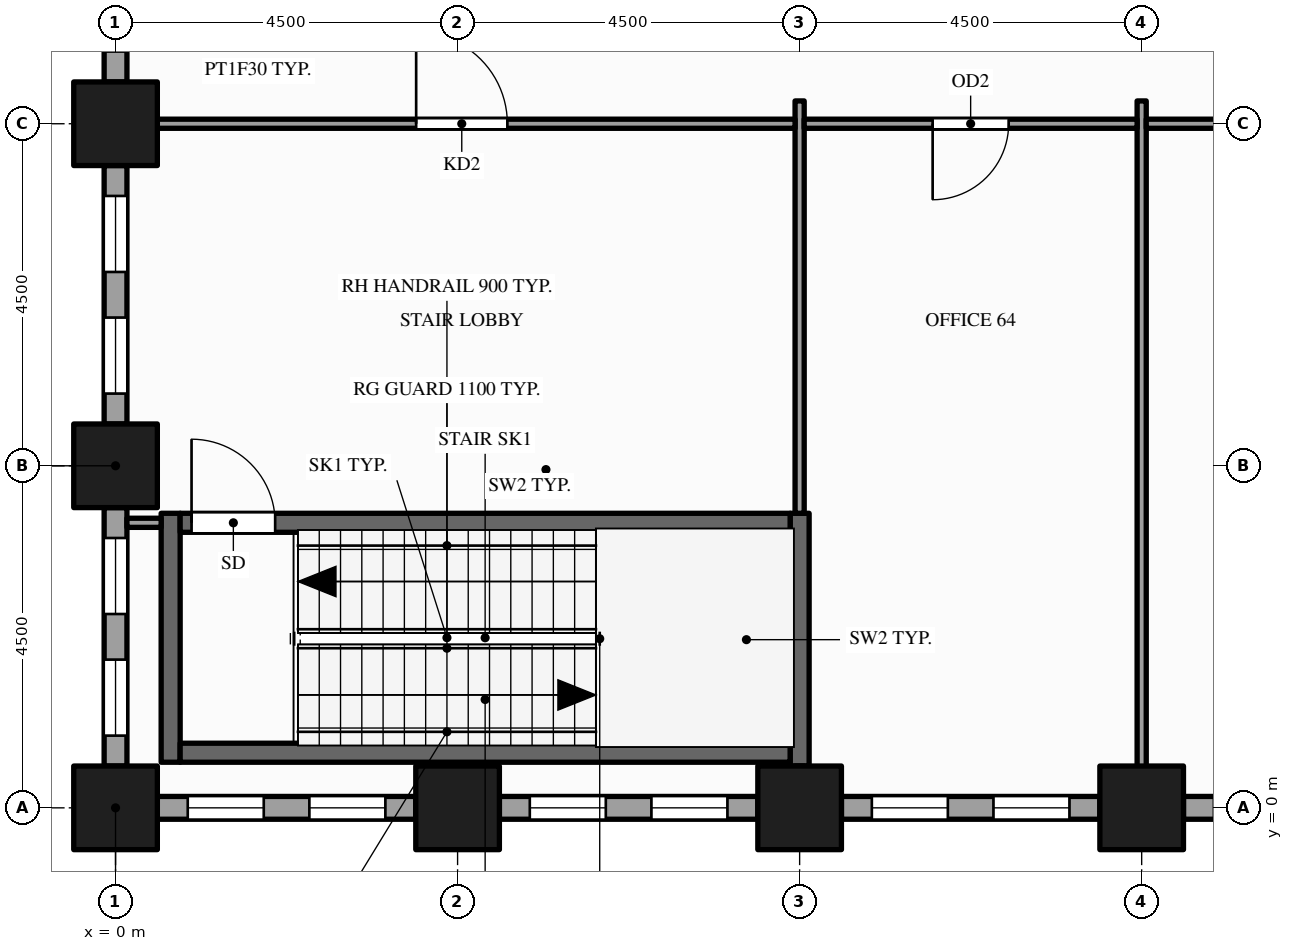
"""IFC4 building model, lengths in metres.
Left out: names, types, materials, properties, quantities, classifications, styles, units other than length and angle.
Written with IfcOpenShell. Run it as: python <this file> out.ifc"""

import sys

from ifc_helpers import new_model, si_unit, direction, frame, frame_2d, origin, origin_2d, place, context, subcontext, project, spatial, rectangle, hollow_rectangle, extrude, element, fill, save


model = new_model("IFC4")
c1 = context("Model", 3, precision=1e-05, world=origin(), true_north=direction((0.0, 1.0)))
c2 = subcontext(c1, "Body", "Model", "MODEL_VIEW")
j1 = project(units=[si_unit("LENGTHUNIT", "METRE"), si_unit("PLANEANGLEUNIT", "RADIAN")], contexts=[c1])
p1 = place(None, origin())
s1 = spatial("IfcSite", under=j1, at=p1, CompositionType="ELEMENT")
p2 = place(p1, origin())
s2 = spatial("IfcBuilding", under=s1, at=p2, CompositionType="ELEMENT")
p3 = place(p2, frame((0.0, 0.0, 24.0)))
s3 = spatial("IfcBuildingStorey", under=s2, at=p3, CompositionType="ELEMENT", Elevation=24.0)
for number, where, z_axis, x_axis in (
    (1, (0.0, 0.0, -0.25), (0.0, 0.0, 1.0), (1.0, 0.0, 0.0)),
    (2, (0.0, 4.5, -0.25), (0.0, 0.0, 1.0), (1.0, 0.0, 0.0)),
    (3, (0.0, 9.0, -0.25), (0.0, 0.0, 1.0), (1.0, 0.0, 0.0)),
    (4, (4.5, 0.0, -0.25), (0.0, 0.0, 1.0), (1.0, 0.0, 0.0)),
    (5, (9.0, 0.0, -0.25), (0.0, 0.0, 1.0), (1.0, 0.0, 0.0)),
    (6, (13.5, 0.0, -0.25), (0.0, 0.0, 1.0), (1.0, 0.0, 0.0)),
):
    element("IfcColumn", number, at=place(p3, frame(where, z_axis=z_axis, x_axis=x_axis)), inside=s3, PredefinedType="COLUMN", context=c2, shape_type="SweptSolid", body=[
        extrude(hollow_rectangle(XDim=1.1, YDim=1.1, WallThickness=0.06, at=origin_2d()), origin(), (0.0, 0.0, 1.0), 5.1),
    ])
p4 = place(p3, frame((0.0, 12.95, 0.0), z_axis=(0.0, 0.0, 1.0), x_axis=(0.0, -1.0, 0.0)))
e7 = element("IfcWall", 7, at=p4, inside=s3, PredefinedType="STANDARD", context=c2, shape_type="SweptSolid", body=[
    extrude(rectangle(XDim=3.4, YDim=0.3, at=frame_2d((1.7, 0.0))), origin(), (0.0, 0.0, 1.0), 4.136),
])
p5 = place(p4, frame((0.4, 0.0, 0.9)))
e8 = element("IfcOpeningElement", 8, at=p5, cuts=e7, PredefinedType="OPENING", context=c2, shape_type="SweptSolid", body=[
    extrude(rectangle(XDim=1.0, YDim=3.0, at=frame_2d((0.5, 1.5))), frame((0.0, 0.16, 0.0), z_axis=(0.0, -1.0, 0.0), x_axis=(1.0, 0.0, 0.0)), (0.0, 0.0, 1.0), 0.32),
])
p6 = place(p4, frame((2.0, 0.0, 0.9)))
e9 = element("IfcOpeningElement", 9, at=p6, cuts=e7, PredefinedType="OPENING", context=c2, shape_type="SweptSolid", body=[
    extrude(rectangle(XDim=1.0, YDim=3.0, at=frame_2d((0.5, 1.5))), frame((0.0, 0.16, 0.0), z_axis=(0.0, -1.0, 0.0), x_axis=(1.0, 0.0, 0.0)), (0.0, 0.0, 1.0), 0.32),
])
p7 = place(p3, frame((0.0, 8.45, 0.0), z_axis=(0.0, 0.0, 1.0), x_axis=(0.0, -1.0, 0.0)))
e10 = element("IfcWall", 10, at=p7, inside=s3, PredefinedType="STANDARD", context=c2, shape_type="SweptSolid", body=[
    extrude(rectangle(XDim=3.4, YDim=0.3, at=frame_2d((1.7, 0.0))), origin(), (0.0, 0.0, 1.0), 4.136),
])
p8 = place(p7, frame((0.4, 0.0, 0.9)))
e11 = element("IfcOpeningElement", 11, at=p8, cuts=e10, PredefinedType="OPENING", context=c2, shape_type="SweptSolid", body=[
    extrude(rectangle(XDim=1.0, YDim=3.0, at=frame_2d((0.5, 1.5))), frame((0.0, 0.16, 0.0), z_axis=(0.0, -1.0, 0.0), x_axis=(1.0, 0.0, 0.0)), (0.0, 0.0, 1.0), 0.32),
])
p9 = place(p7, frame((2.0, 0.0, 0.9)))
e12 = element("IfcOpeningElement", 12, at=p9, cuts=e10, PredefinedType="OPENING", context=c2, shape_type="SweptSolid", body=[
    extrude(rectangle(XDim=1.0, YDim=3.0, at=frame_2d((0.5, 1.5))), frame((0.0, 0.16, 0.0), z_axis=(0.0, -1.0, 0.0), x_axis=(1.0, 0.0, 0.0)), (0.0, 0.0, 1.0), 0.32),
])
p10 = place(p3, frame((0.0, 3.95, 0.0), z_axis=(0.0, 0.0, 1.0), x_axis=(0.0, -1.0, 0.0)))
e13 = element("IfcWall", 13, at=p10, inside=s3, PredefinedType="STANDARD", context=c2, shape_type="SweptSolid", body=[
    extrude(rectangle(XDim=3.4, YDim=0.3, at=frame_2d((1.7, 0.0))), origin(), (0.0, 0.0, 1.0), 4.136),
])
p11 = place(p10, frame((0.4, 0.0, 0.9)))
e14 = element("IfcOpeningElement", 14, at=p11, cuts=e13, PredefinedType="OPENING", context=c2, shape_type="SweptSolid", body=[
    extrude(rectangle(XDim=1.0, YDim=3.0, at=frame_2d((0.5, 1.5))), frame((0.0, 0.16, 0.0), z_axis=(0.0, -1.0, 0.0), x_axis=(1.0, 0.0, 0.0)), (0.0, 0.0, 1.0), 0.32),
])
p12 = place(p10, frame((2.0, 0.0, 0.9)))
e15 = element("IfcOpeningElement", 15, at=p12, cuts=e13, PredefinedType="OPENING", context=c2, shape_type="SweptSolid", body=[
    extrude(rectangle(XDim=1.0, YDim=3.0, at=frame_2d((0.5, 1.5))), frame((0.0, 0.16, 0.0), z_axis=(0.0, -1.0, 0.0), x_axis=(1.0, 0.0, 0.0)), (0.0, 0.0, 1.0), 0.32),
])
p13 = place(p3, frame((0.55, 0.0, 0.0), z_axis=(0.0, 0.0, 1.0), x_axis=(1.0, 0.0, 0.0)))
e16 = element("IfcWall", 16, at=p13, inside=s3, PredefinedType="STANDARD", context=c2, shape_type="SweptSolid", body=[
    extrude(rectangle(XDim=3.4, YDim=0.3, at=frame_2d((1.7, 0.0))), origin(), (0.0, 0.0, 1.0), 4.136),
])
p14 = place(p13, frame((0.4, 0.0, 0.9)))
e17 = element("IfcOpeningElement", 17, at=p14, cuts=e16, PredefinedType="OPENING", context=c2, shape_type="SweptSolid", body=[
    extrude(rectangle(XDim=1.0, YDim=3.0, at=frame_2d((0.5, 1.5))), frame((0.0, 0.16, 0.0), z_axis=(0.0, -1.0, 0.0), x_axis=(1.0, 0.0, 0.0)), (0.0, 0.0, 1.0), 0.32),
])
p15 = place(p13, frame((2.0, 0.0, 0.9)))
e18 = element("IfcOpeningElement", 18, at=p15, cuts=e16, PredefinedType="OPENING", context=c2, shape_type="SweptSolid", body=[
    extrude(rectangle(XDim=1.0, YDim=3.0, at=frame_2d((0.5, 1.5))), frame((0.0, 0.16, 0.0), z_axis=(0.0, -1.0, 0.0), x_axis=(1.0, 0.0, 0.0)), (0.0, 0.0, 1.0), 0.32),
])
p16 = place(p3, frame((5.05, 0.0, 0.0), z_axis=(0.0, 0.0, 1.0), x_axis=(1.0, 0.0, 0.0)))
e19 = element("IfcWall", 19, at=p16, inside=s3, PredefinedType="STANDARD", context=c2, shape_type="SweptSolid", body=[
    extrude(rectangle(XDim=3.4, YDim=0.3, at=frame_2d((1.7, 0.0))), origin(), (0.0, 0.0, 1.0), 4.136),
])
p17 = place(p16, frame((0.4, 0.0, 0.9)))
e20 = element("IfcOpeningElement", 20, at=p17, cuts=e19, PredefinedType="OPENING", context=c2, shape_type="SweptSolid", body=[
    extrude(rectangle(XDim=1.0, YDim=3.0, at=frame_2d((0.5, 1.5))), frame((0.0, 0.16, 0.0), z_axis=(0.0, -1.0, 0.0), x_axis=(1.0, 0.0, 0.0)), (0.0, 0.0, 1.0), 0.32),
])
p18 = place(p16, frame((2.0, 0.0, 0.9)))
e21 = element("IfcOpeningElement", 21, at=p18, cuts=e19, PredefinedType="OPENING", context=c2, shape_type="SweptSolid", body=[
    extrude(rectangle(XDim=1.0, YDim=3.0, at=frame_2d((0.5, 1.5))), frame((0.0, 0.16, 0.0), z_axis=(0.0, -1.0, 0.0), x_axis=(1.0, 0.0, 0.0)), (0.0, 0.0, 1.0), 0.32),
])
p19 = place(p3, frame((9.55, 0.0, 0.0), z_axis=(0.0, 0.0, 1.0), x_axis=(1.0, 0.0, 0.0)))
e22 = element("IfcWall", 22, at=p19, inside=s3, PredefinedType="STANDARD", context=c2, shape_type="SweptSolid", body=[
    extrude(rectangle(XDim=3.4, YDim=0.3, at=frame_2d((1.7, 0.0))), origin(), (0.0, 0.0, 1.0), 4.136),
])
p20 = place(p19, frame((0.4, 0.0, 0.9)))
e23 = element("IfcOpeningElement", 23, at=p20, cuts=e22, PredefinedType="OPENING", context=c2, shape_type="SweptSolid", body=[
    extrude(rectangle(XDim=1.0, YDim=3.0, at=frame_2d((0.5, 1.5))), frame((0.0, 0.16, 0.0), z_axis=(0.0, -1.0, 0.0), x_axis=(1.0, 0.0, 0.0)), (0.0, 0.0, 1.0), 0.32),
])
p21 = place(p19, frame((2.0, 0.0, 0.9)))
e24 = element("IfcOpeningElement", 24, at=p21, cuts=e22, PredefinedType="OPENING", context=c2, shape_type="SweptSolid", body=[
    extrude(rectangle(XDim=1.0, YDim=3.0, at=frame_2d((0.5, 1.5))), frame((0.0, 0.16, 0.0), z_axis=(0.0, -1.0, 0.0), x_axis=(1.0, 0.0, 0.0)), (0.0, 0.0, 1.0), 0.32),
])
p22 = place(p3, frame((14.05, 0.0, 0.0), z_axis=(0.0, 0.0, 1.0), x_axis=(1.0, 0.0, 0.0)))
e25 = element("IfcWall", 25, at=p22, inside=s3, PredefinedType="STANDARD", context=c2, shape_type="SweptSolid", body=[
    extrude(rectangle(XDim=3.4, YDim=0.3, at=frame_2d((1.7, 0.0))), origin(), (0.0, 0.0, 1.0), 4.136),
])
p23 = place(p22, frame((0.4, 0.0, 0.9)))
e26 = element("IfcOpeningElement", 26, at=p23, cuts=e25, PredefinedType="OPENING", context=c2, shape_type="SweptSolid", body=[
    extrude(rectangle(XDim=1.0, YDim=3.0, at=frame_2d((0.5, 1.5))), frame((0.0, 0.16, 0.0), z_axis=(0.0, -1.0, 0.0), x_axis=(1.0, 0.0, 0.0)), (0.0, 0.0, 1.0), 0.32),
])
p24 = place(p22, frame((2.0, 0.0, 0.9)))
e27 = element("IfcOpeningElement", 27, at=p24, cuts=e25, PredefinedType="OPENING", context=c2, shape_type="SweptSolid", body=[
    extrude(rectangle(XDim=1.0, YDim=3.0, at=frame_2d((0.5, 1.5))), frame((0.0, 0.16, 0.0), z_axis=(0.0, -1.0, 0.0), x_axis=(1.0, 0.0, 0.0)), (0.0, 0.0, 1.0), 0.32),
])
p25 = place(p3, frame((0.725, 0.6, 0.0), z_axis=(0.0, 0.0, 1.0), x_axis=(0.0, 1.0, 0.0)))
e28 = element("IfcWall", 28, at=p25, inside=s3, PredefinedType="SHEAR", context=c2, shape_type="SweptSolid", body=[
    extrude(rectangle(XDim=3.275, YDim=0.25, at=frame_2d((1.637, 0.0))), origin(), (0.0, 0.0, 1.0), 4.85),
])
p26 = place(p3, frame((9.0, 0.15, 0.0), z_axis=(0.0, 0.0, 1.0), x_axis=(0.0, 1.0, 0.0)))
e29 = element("IfcWall", 29, at=p26, inside=s3, PredefinedType="PARTITIONING", context=c2, shape_type="SweptSolid", body=[
    extrude(rectangle(XDim=0.4, YDim=0.12, at=frame_2d((0.2, 0.0))), origin(), (0.0, 0.0, 1.0), 4.85),
])
p27 = place(p3, frame((9.0, 0.55, 0.0), z_axis=(0.0, 0.0, 1.0), x_axis=(0.0, 1.0, 0.0)))
e30 = element("IfcWall", 30, at=p27, inside=s3, PredefinedType="SHEAR", context=c2, shape_type="SweptSolid", body=[
    extrude(rectangle(XDim=3.325, YDim=0.25, at=frame_2d((1.663, 0.0))), origin(), (0.0, 0.0, 1.0), 4.85),
])
p28 = place(p3, frame((9.0, 3.875, 0.0), z_axis=(0.0, 0.0, 1.0), x_axis=(0.0, 1.0, 0.0)))
e31 = element("IfcWall", 31, at=p28, inside=s3, PredefinedType="PARTITIONING", context=c2, shape_type="SweptSolid", body=[
    extrude(rectangle(XDim=5.425, YDim=0.12, at=frame_2d((2.712, 0.0))), origin(), (0.0, 0.0, 1.0), 3.938),
])
p29 = place(p3, frame((13.5, 0.15, 0.0), z_axis=(0.0, 0.0, 1.0), x_axis=(0.0, 1.0, 0.0)))
e32 = element("IfcWall", 32, at=p29, inside=s3, PredefinedType="PARTITIONING", context=c2, shape_type="SweptSolid", body=[
    extrude(rectangle(XDim=9.15, YDim=0.12, at=frame_2d((4.575, 0.0))), origin(), (0.0, 0.0, 1.0), 3.938),
])
p30 = place(p3, frame((0.85, 0.725, 0.0), z_axis=(0.0, 0.0, 1.0), x_axis=(1.0, 0.0, 0.0)))
e33 = element("IfcWall", 33, at=p30, inside=s3, PredefinedType="SHEAR", context=c2, shape_type="SweptSolid", body=[
    extrude(rectangle(XDim=8.025, YDim=0.25, at=frame_2d((4.012, 0.0))), origin(), (0.0, 0.0, 1.0), 4.85),
])
p31 = place(p3, frame((0.15, 3.75, 0.0), z_axis=(0.0, 0.0, 1.0), x_axis=(1.0, 0.0, 0.0)))
e34 = element("IfcWall", 34, at=p31, inside=s3, PredefinedType="PARTITIONING", context=c2, shape_type="SweptSolid", body=[
    extrude(rectangle(XDim=0.45, YDim=0.12, at=frame_2d((0.225, 0.0))), origin(), (0.0, 0.0, 1.0), 4.144),
])
p32 = place(p3, frame((0.85, 3.75, 0.0), z_axis=(0.0, 0.0, 1.0), x_axis=(1.0, 0.0, 0.0)))
e35 = element("IfcWall", 35, at=p32, inside=s3, PredefinedType="SHEAR", context=c2, shape_type="SweptSolid", body=[
    extrude(rectangle(XDim=8.025, YDim=0.25, at=frame_2d((4.012, 0.0))), origin(), (0.0, 0.0, 1.0), 4.85),
])
p33 = place(p32, frame((0.15, 0.0, 0.0)))
e36 = element("IfcOpeningElement", 36, at=p33, cuts=e35, PredefinedType="OPENING", context=c2, shape_type="SweptSolid", body=[
    extrude(rectangle(XDim=1.1, YDim=2.1, at=frame_2d((0.55, 1.05))), frame((0.0, 0.135, 0.0), z_axis=(0.0, -1.0, 0.0), x_axis=(1.0, 0.0, 0.0)), (0.0, 0.0, 1.0), 0.27),
])
p34 = place(p3, frame((0.15, 9.0, 0.0), z_axis=(0.0, 0.0, 1.0), x_axis=(1.0, 0.0, 0.0)))
e37 = element("IfcWall", 37, at=p34, inside=s3, PredefinedType="PARTITIONING", context=c2, shape_type="SweptSolid", body=[
    extrude(rectangle(XDim=8.79, YDim=0.12, at=frame_2d((4.395, 0.0))), origin(), (0.0, 0.0, 1.0), 3.938),
])
p35 = place(p34, frame((3.805, 0.0, 0.0)))
e38 = element("IfcOpeningElement", 38, at=p35, cuts=e37, PredefinedType="OPENING", context=c2, shape_type="SweptSolid", body=[
    extrude(rectangle(XDim=1.2, YDim=2.1, at=frame_2d((0.6, 1.05))), frame((0.0, 0.07, 0.0), z_axis=(0.0, -1.0, 0.0), x_axis=(1.0, 0.0, 0.0)), (0.0, 0.0, 1.0), 0.14),
])
p36 = place(p3, frame((9.06, 9.0, 0.0), z_axis=(0.0, 0.0, 1.0), x_axis=(1.0, 0.0, 0.0)))
e39 = element("IfcWall", 39, at=p36, inside=s3, PredefinedType="PARTITIONING", context=c2, shape_type="SweptSolid", body=[
    extrude(rectangle(XDim=4.38, YDim=0.12, at=frame_2d((2.19, 0.0))), origin(), (0.0, 0.0, 1.0), 3.938),
])
p37 = place(p36, frame((1.69, 0.0, 0.0)))
e40 = element("IfcOpeningElement", 40, at=p37, cuts=e39, PredefinedType="OPENING", context=c2, shape_type="SweptSolid", body=[
    extrude(rectangle(XDim=1.0, YDim=2.1, at=frame_2d((0.5, 1.05))), frame((0.0, 0.07, 0.0), z_axis=(0.0, -1.0, 0.0), x_axis=(1.0, 0.0, 0.0)), (0.0, 0.0, 1.0), 0.14),
])
p38 = place(p3, frame((13.56, 9.0, 0.0), z_axis=(0.0, 0.0, 1.0), x_axis=(1.0, 0.0, 0.0)))
e41 = element("IfcWall", 41, at=p38, inside=s3, PredefinedType="PARTITIONING", context=c2, shape_type="SweptSolid", body=[
    extrude(rectangle(XDim=8.88, YDim=0.12, at=frame_2d((4.44, 0.0))), origin(), (0.0, 0.0, 1.0), 3.938),
])
p39 = place(p38, frame((3.94, 0.0, 0.0)))
e42 = element("IfcOpeningElement", 42, at=p39, cuts=e41, PredefinedType="OPENING", context=c2, shape_type="SweptSolid", body=[
    extrude(rectangle(XDim=1.0, YDim=2.1, at=frame_2d((0.5, 1.05))), frame((0.0, 0.07, 0.0), z_axis=(0.0, -1.0, 0.0), x_axis=(1.0, 0.0, 0.0)), (0.0, 0.0, 1.0), 0.14),
])
p40 = place(p8, origin())
e43 = element("IfcWindow", 43, at=p40, inside=s3, PartitioningType="SINGLE_PANEL", PredefinedType="WINDOW", context=c2, shape_type="SweptSolid", body=[
    extrude(rectangle(XDim=1.0, YDim=3.0, at=frame_2d((0.5, 1.5))), frame((0.0, 0.03, 0.0), z_axis=(0.0, -1.0, 0.0), x_axis=(1.0, 0.0, 0.0)), (0.0, 0.0, 1.0), 0.06),
])
fill(e11, e43)
p41 = place(p9, origin())
e44 = element("IfcWindow", 44, at=p41, inside=s3, PartitioningType="SINGLE_PANEL", PredefinedType="WINDOW", context=c2, shape_type="SweptSolid", body=[
    extrude(rectangle(XDim=1.0, YDim=3.0, at=frame_2d((0.5, 1.5))), frame((0.0, 0.03, 0.0), z_axis=(0.0, -1.0, 0.0), x_axis=(1.0, 0.0, 0.0)), (0.0, 0.0, 1.0), 0.06),
])
fill(e12, e44)
p42 = place(p11, origin())
e45 = element("IfcWindow", 45, at=p42, inside=s3, PartitioningType="SINGLE_PANEL", PredefinedType="WINDOW", context=c2, shape_type="SweptSolid", body=[
    extrude(rectangle(XDim=1.0, YDim=3.0, at=frame_2d((0.5, 1.5))), frame((0.0, 0.03, 0.0), z_axis=(0.0, -1.0, 0.0), x_axis=(1.0, 0.0, 0.0)), (0.0, 0.0, 1.0), 0.06),
])
fill(e14, e45)
p43 = place(p12, origin())
e46 = element("IfcWindow", 46, at=p43, inside=s3, PartitioningType="SINGLE_PANEL", PredefinedType="WINDOW", context=c2, shape_type="SweptSolid", body=[
    extrude(rectangle(XDim=1.0, YDim=3.0, at=frame_2d((0.5, 1.5))), frame((0.0, 0.03, 0.0), z_axis=(0.0, -1.0, 0.0), x_axis=(1.0, 0.0, 0.0)), (0.0, 0.0, 1.0), 0.06),
])
fill(e15, e46)
p44 = place(p14, origin())
e47 = element("IfcWindow", 47, at=p44, inside=s3, PartitioningType="SINGLE_PANEL", PredefinedType="WINDOW", context=c2, shape_type="SweptSolid", body=[
    extrude(rectangle(XDim=1.0, YDim=3.0, at=frame_2d((0.5, 1.5))), frame((0.0, 0.03, 0.0), z_axis=(0.0, -1.0, 0.0), x_axis=(1.0, 0.0, 0.0)), (0.0, 0.0, 1.0), 0.06),
])
fill(e17, e47)
p45 = place(p15, origin())
e48 = element("IfcWindow", 48, at=p45, inside=s3, PartitioningType="SINGLE_PANEL", PredefinedType="WINDOW", context=c2, shape_type="SweptSolid", body=[
    extrude(rectangle(XDim=1.0, YDim=3.0, at=frame_2d((0.5, 1.5))), frame((0.0, 0.03, 0.0), z_axis=(0.0, -1.0, 0.0), x_axis=(1.0, 0.0, 0.0)), (0.0, 0.0, 1.0), 0.06),
])
fill(e18, e48)
p46 = place(p17, origin())
e49 = element("IfcWindow", 49, at=p46, inside=s3, PartitioningType="SINGLE_PANEL", PredefinedType="WINDOW", context=c2, shape_type="SweptSolid", body=[
    extrude(rectangle(XDim=1.0, YDim=3.0, at=frame_2d((0.5, 1.5))), frame((0.0, 0.03, 0.0), z_axis=(0.0, -1.0, 0.0), x_axis=(1.0, 0.0, 0.0)), (0.0, 0.0, 1.0), 0.06),
])
fill(e20, e49)
p47 = place(p18, origin())
e50 = element("IfcWindow", 50, at=p47, inside=s3, PartitioningType="SINGLE_PANEL", PredefinedType="WINDOW", context=c2, shape_type="SweptSolid", body=[
    extrude(rectangle(XDim=1.0, YDim=3.0, at=frame_2d((0.5, 1.5))), frame((0.0, 0.03, 0.0), z_axis=(0.0, -1.0, 0.0), x_axis=(1.0, 0.0, 0.0)), (0.0, 0.0, 1.0), 0.06),
])
fill(e21, e50)
p48 = place(p20, origin())
e51 = element("IfcWindow", 51, at=p48, inside=s3, PartitioningType="SINGLE_PANEL", PredefinedType="WINDOW", context=c2, shape_type="SweptSolid", body=[
    extrude(rectangle(XDim=1.0, YDim=3.0, at=frame_2d((0.5, 1.5))), frame((0.0, 0.03, 0.0), z_axis=(0.0, -1.0, 0.0), x_axis=(1.0, 0.0, 0.0)), (0.0, 0.0, 1.0), 0.06),
])
fill(e23, e51)
p49 = place(p21, origin())
e52 = element("IfcWindow", 52, at=p49, inside=s3, PartitioningType="SINGLE_PANEL", PredefinedType="WINDOW", context=c2, shape_type="SweptSolid", body=[
    extrude(rectangle(XDim=1.0, YDim=3.0, at=frame_2d((0.5, 1.5))), frame((0.0, 0.03, 0.0), z_axis=(0.0, -1.0, 0.0), x_axis=(1.0, 0.0, 0.0)), (0.0, 0.0, 1.0), 0.06),
])
fill(e24, e52)
p50 = place(p33, origin())
e53 = element("IfcDoor", 53, at=p50, inside=s3, OperationType="SINGLE_SWING_LEFT", PredefinedType="DOOR", context=c2, shape_type="SweptSolid", body=[
    extrude(rectangle(XDim=1.1, YDim=2.1, at=frame_2d((0.55, 1.05))), frame((0.0, 0.025, 0.0), z_axis=(0.0, -1.0, 0.0), x_axis=(1.0, 0.0, 0.0)), (0.0, 0.0, 1.0), 0.05),
])
fill(e36, e53)
p51 = place(p35, origin())
e54 = element("IfcDoor", 54, at=p51, inside=s3, OperationType="SINGLE_SWING_LEFT", PredefinedType="DOOR", context=c2, shape_type="SweptSolid", body=[
    extrude(rectangle(XDim=1.2, YDim=2.1, at=frame_2d((0.6, 1.05))), frame((0.0, 0.025, 0.0), z_axis=(0.0, -1.0, 0.0), x_axis=(1.0, 0.0, 0.0)), (0.0, 0.0, 1.0), 0.05),
])
fill(e38, e54)
p52 = place(p37, origin())
e55 = element("IfcDoor", 55, at=p52, inside=s3, OperationType="SINGLE_SWING_LEFT", PredefinedType="DOOR", context=c2, shape_type="SweptSolid", body=[
    extrude(rectangle(XDim=1.0, YDim=2.1, at=frame_2d((0.5, 1.05))), frame((0.0, 0.025, 0.0), z_axis=(0.0, -1.0, 0.0), x_axis=(1.0, 0.0, 0.0)), (0.0, 0.0, 1.0), 0.05),
])
fill(e40, e55)
save(model, sys.argv[1])
